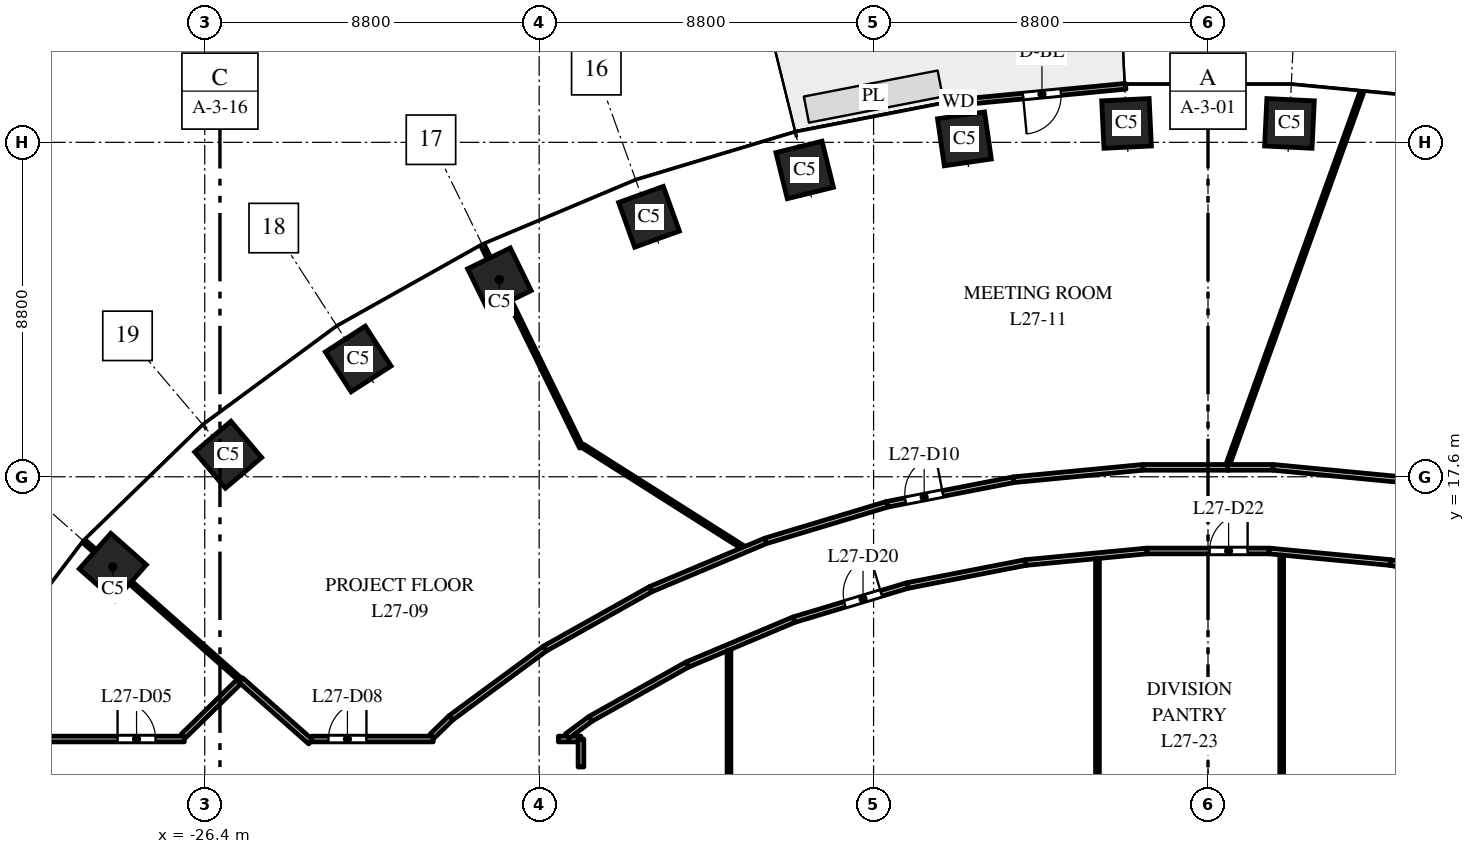
"""IFC4 building model, lengths in metres.
Left out: names, types, materials, properties, quantities, classifications, styles, units other than length and angle.
Written with IfcOpenShell. Run it as: python <this file> out.ifc"""

import sys

from ifc_helpers import new_model, si_unit, direction, frame, frame_2d, origin, origin_2d, place, context, subcontext, project, spatial, rectangle, extrude, element, fill, save


model = new_model("IFC4")
c1 = context("Model", 3, precision=1e-05, world=origin(), true_north=direction((0.0, 1.0)))
c2 = subcontext(c1, "Body", "Model", "MODEL_VIEW")
j1 = project(units=[si_unit("LENGTHUNIT", "METRE"), si_unit("PLANEANGLEUNIT", "RADIAN")], contexts=[c1])
p1 = place(None, origin())
s1 = spatial("IfcSite", under=j1, at=p1, CompositionType="ELEMENT")
p2 = place(p1, origin())
s2 = spatial("IfcBuilding", under=s1, at=p2, CompositionType="ELEMENT")
p3 = place(p2, frame((0.0, 0.0, 120.0)))
s3 = spatial("IfcBuildingStorey", under=s2, at=p3, CompositionType="ELEMENT", Elevation=120.0)
for number, where, z_axis, x_axis in (
    (1, (2.143, 26.898, 0.0), (0.0, 0.0, 1.0), (-0.999, 0.048, 0.0)),
    (2, (-2.143, 26.898, 0.0), (0.0, 0.0, 1.0), (-0.999, -0.048, 0.0)),
    (3, (-6.409, 26.491, 0.0), (0.0, 0.0, 1.0), (-0.99, -0.143, 0.0)),
    (4, (-10.613, 25.674, 0.0), (0.0, 0.0, 1.0), (-0.971, -0.24, 0.0)),
    (5, (-14.709, 24.441, 0.0), (0.0, 0.0, 1.0), (-0.941, -0.338, 0.0)),
    (6, (-18.646, 22.785, 0.0), (0.0, 0.0, 1.0), (-0.898, -0.439, 0.0)),
    (7, (-22.362, 20.7, 0.0), (0.0, 0.0, 1.0), (-0.84, -0.542, 0.0)),
    (8, (-25.783, 18.18, 0.0), (0.0, 0.0, 1.0), (-0.763, -0.646, 0.0)),
    (9, (-28.819, 15.23, 0.0), (0.0, 0.0, 1.0), (-0.663, -0.749, 0.0)),
):
    element("IfcColumn", number, at=place(p3, frame(where, z_axis=z_axis, x_axis=x_axis)), inside=s3, PredefinedType="COLUMN", context=c2, shape_type="SweptSolid", body=[
        extrude(rectangle(XDim=1.25, YDim=1.25, at=origin_2d()), origin(), (0.0, 0.0, 1.0), 4.0),
    ])
p4 = place(p3, frame((-2.166, 27.875, 0.0), z_axis=(0.0, 0.0, 1.0), x_axis=(-0.995473879823, -0.095035543824, 0.0)))
e10 = element("IfcWall", 10, at=p4, inside=s3, PredefinedType="STANDARD", context=c2, shape_type="SweptSolid", body=[
    extrude(rectangle(XDim=4.426, YDim=0.15, at=frame_2d((2.213, 0.0))), origin(), (0.0, 0.0, 1.0), 3.7),
])
p5 = place(p4, frame((1.713, 0.0, 0.0)))
e11 = element("IfcOpeningElement", 11, at=p5, cuts=e10, PredefinedType="OPENING", context=c2, shape_type="SweptSolid", body=[
    extrude(rectangle(XDim=1.0, YDim=2.4, at=frame_2d((0.5, 1.2))), frame((0.0, 0.085, 0.0), z_axis=(0.0, -1.0, 0.0), x_axis=(1.0, 0.0, 0.0)), (0.0, 0.0, 1.0), 0.17),
])
p6 = place(p3, frame((-31.5, 10.7, 0.0), z_axis=(0.0, 0.0, 1.0), x_axis=(1.0, 0.0, 0.0)))
e12 = element("IfcWall", 12, at=p6, inside=s3, PredefinedType="PARTITIONING", context=c2, shape_type="SweptSolid", body=[
    extrude(rectangle(XDim=4.563, YDim=0.15, at=frame_2d((2.281, 0.0))), origin(), (0.0, 0.0, 1.0), 3.1),
])
p7 = place(p6, frame((2.806, 0.0, 0.0)))
e13 = element("IfcOpeningElement", 13, at=p7, cuts=e12, PredefinedType="OPENING", context=c2, shape_type="SweptSolid", body=[
    extrude(rectangle(XDim=1.0, YDim=2.1, at=frame_2d((0.5, 1.05))), frame((0.0, 0.085, 0.0), z_axis=(0.0, -1.0, 0.0), x_axis=(1.0, 0.0, 0.0)), (0.0, 0.0, 1.0), 0.17),
])
p8 = place(p3, frame((-29.569, 15.895, 0.0), z_axis=(0.0, 0.0, 1.0), x_axis=(0.74891259533, -0.662668789484, 0.0)))
e14 = element("IfcWall", 14, at=p8, inside=s3, PredefinedType="PARTITIONING", context=c2, shape_type="SweptSolid", body=[
    extrude(rectangle(XDim=5.495, YDim=0.1, at=frame_2d((2.747, 0.0))), origin(), (0.0, 0.0, 1.0), 2.9),
])
p9 = place(p3, frame((-26.964, 10.777, 0.0), z_axis=(0.0, 0.0, 1.0), x_axis=(0.714923203438, 0.699202984251, 0.0)))
e15 = element("IfcWall", 15, at=p9, inside=s3, PredefinedType="PARTITIONING", context=c2, shape_type="SweptSolid", body=[
    extrude(rectangle(XDim=2.112, YDim=0.15, at=frame_2d((1.056, 0.0))), origin(), (0.0, 0.0, 1.0), 3.7),
])
p10 = place(p3, frame((-25.454, 12.254, 0.0), z_axis=(0.0, 0.0, 1.0), x_axis=(0.74918446265, -0.662361412617, 0.0)))
e16 = element("IfcWall", 16, at=p10, inside=s3, PredefinedType="PARTITIONING", context=c2, shape_type="SweptSolid", body=[
    extrude(rectangle(XDim=2.455, YDim=0.15, at=frame_2d((1.228, 0.0))), origin(), (0.0, 0.0, 1.0), 3.7),
])
p11 = place(p3, frame((-23.584, 10.7, 0.0), z_axis=(0.0, 0.0, 1.0), x_axis=(1.0, 0.0, 0.0)))
e17 = element("IfcWall", 17, at=p11, inside=s3, PredefinedType="PARTITIONING", context=c2, shape_type="SweptSolid", body=[
    extrude(rectangle(XDim=3.197, YDim=0.15, at=frame_2d((1.599, 0.0))), origin(), (0.0, 0.0, 1.0), 3.7),
])
p12 = place(p11, frame((0.439, 0.0, 0.0)))
e18 = element("IfcOpeningElement", 18, at=p12, cuts=e17, PredefinedType="OPENING", context=c2, shape_type="SweptSolid", body=[
    extrude(rectangle(XDim=1.0, YDim=2.1, at=frame_2d((0.5, 1.05))), frame((0.0, 0.085, 0.0), z_axis=(0.0, -1.0, 0.0), x_axis=(1.0, 0.0, 0.0)), (0.0, 0.0, 1.0), 0.17),
])
p13 = place(p3, frame((-20.418, 10.775, 0.0), z_axis=(0.0, 0.0, 1.0), x_axis=(0.717033879939, 0.697038316751, 0.0)))
e19 = element("IfcWall", 19, at=p13, inside=s3, PredefinedType="PARTITIONING", context=c2, shape_type="SweptSolid", body=[
    extrude(rectangle(XDim=0.696, YDim=0.15, at=frame_2d((0.348, 0.0))), origin(), (0.0, 0.0, 1.0), 3.7),
])
p14 = place(p3, frame((-19.919, 11.26, 0.0), z_axis=(0.0, 0.0, 1.0), x_axis=(0.805185638843, 0.593022838516, 0.0)))
e20 = element("IfcWall", 20, at=p14, inside=s3, PredefinedType="PARTITIONING", context=c2, shape_type="SweptSolid", body=[
    extrude(rectangle(XDim=3.073, YDim=0.15, at=frame_2d((1.536, 0.0))), origin(), (0.0, 0.0, 1.0), 2.75),
])
p15 = place(p3, frame((-19.086, 23.685, 0.0), z_axis=(0.0, 0.0, 1.0), x_axis=(0.439196051017, -0.898391244821, 0.0)))
e21 = element("IfcWall", 21, at=p15, inside=s3, PredefinedType="PARTITIONING", context=c2, shape_type="SweptSolid", body=[
    extrude(rectangle(XDim=5.908, YDim=0.1, at=frame_2d((2.954, 0.0))), origin(), (0.0, 0.0, 1.0), 3.7),
])
p16 = place(p3, frame((-17.445, 13.082, 0.0), z_axis=(0.0, 0.0, 1.0), x_axis=(0.872072095629, 0.489377420837, 0.0)))
e22 = element("IfcWall", 22, at=p16, inside=s3, PredefinedType="PARTITIONING", context=c2, shape_type="SweptSolid", body=[
    extrude(rectangle(XDim=3.188, YDim=0.15, at=frame_2d((1.594, 0.0))), origin(), (0.0, 0.0, 1.0), 3.7),
])
p17 = place(p3, frame((-17.095, 10.7, 0.0), z_axis=(0.0, 0.0, 1.0), x_axis=(1.0, 0.0, 0.0)))
e23 = element("IfcWall", 23, at=p17, inside=s3, PredefinedType="PARTITIONING", context=c2, shape_type="SweptSolid", body=[
    extrude(rectangle(XDim=0.595, YDim=0.15, at=frame_2d((0.297, 0.0))), origin(), (0.0, 0.0, 1.0), 3.7),
])
p18 = place(p3, frame((-16.867, 10.775, 0.0), z_axis=(0.0, 0.0, 1.0), x_axis=(0.804751563869, 0.593611759023, 0.0)))
e24 = element("IfcWall", 24, at=p18, inside=s3, PredefinedType="PARTITIONING", context=c2, shape_type="SweptSolid", body=[
    extrude(rectangle(XDim=0.767, YDim=0.15, at=frame_2d((0.383, 0.0))), origin(), (0.0, 0.0, 1.0), 3.7),
])
p19 = place(p3, frame((-16.452, 18.412, 0.0), z_axis=(0.0, 0.0, 1.0), x_axis=(0.844845649947, -0.535010119312, 0.0)))
e25 = element("IfcWall", 25, at=p19, inside=s3, PredefinedType="PARTITIONING", context=c2, shape_type="SweptSolid", body=[
    extrude(rectangle(XDim=4.983, YDim=0.1, at=frame_2d((2.492, 0.0))), origin(), (0.0, 0.0, 1.0), 2.85),
])
p20 = place(p3, frame((-16.5, 9.964, 0.0), z_axis=(0.0, 0.0, 1.0), x_axis=(0.0, 1.0, 0.0)))
e26 = element("IfcWall", 26, at=p20, inside=s3, PredefinedType="PARTITIONING", context=c2, shape_type="SweptSolid", body=[
    extrude(rectangle(XDim=0.736, YDim=0.15, at=frame_2d((0.368, 0.0))), origin(), (0.0, 0.0, 1.0), 3.7),
])
p21 = place(p3, frame((-16.25, 11.23, 0.0), z_axis=(0.0, 0.0, 1.0), x_axis=(0.872147381065, 0.489243237767, 0.0)))
e27 = element("IfcWall", 27, at=p21, inside=s3, PredefinedType="PARTITIONING", context=c2, shape_type="SweptSolid", body=[
    extrude(rectangle(XDim=2.927, YDim=0.15, at=frame_2d((1.464, 0.0))), origin(), (0.0, 0.0, 1.0), 2.75),
])
p22 = place(p3, frame((-14.665, 14.642, 0.0), z_axis=(0.0, 0.0, 1.0), x_axis=(0.921789499058, 0.38769075231, 0.0)))
e28 = element("IfcWall", 28, at=p22, inside=s3, PredefinedType="PARTITIONING", context=c2, shape_type="SweptSolid", body=[
    extrude(rectangle(XDim=3.278, YDim=0.15, at=frame_2d((1.639, 0.0))), origin(), (0.0, 0.0, 1.0), 2.85),
])
p23 = place(p3, frame((-13.697, 12.662, 0.0), z_axis=(0.0, 0.0, 1.0), x_axis=(0.921751821358, 0.387780324183, 0.0)))
e29 = element("IfcWall", 29, at=p23, inside=s3, PredefinedType="PARTITIONING", context=c2, shape_type="SweptSolid", body=[
    extrude(rectangle(XDim=3.038, YDim=0.15, at=frame_2d((1.519, 0.0))), origin(), (0.0, 0.0, 1.0), 2.85),
])
p24 = place(p3, frame((-12.605, -13.036, 0.0), z_axis=(0.0, 0.0, 1.0), x_axis=(0.0, 1.0, 0.0)))
e30 = element("IfcWall", 30, at=p24, inside=s3, PredefinedType="PARTITIONING", context=c2, shape_type="SweptSolid", body=[
    extrude(rectangle(XDim=26.072, YDim=0.1, at=frame_2d((13.036, 0.0))), origin(), (0.0, 0.0, 1.0), 2.75),
])
p25 = place(p3, frame((-11.643, 15.913, 0.0), z_axis=(0.0, 0.0, 1.0), x_axis=(0.957584891346, 0.288151307243, 0.0)))
e31 = element("IfcWall", 31, at=p25, inside=s3, PredefinedType="PARTITIONING", context=c2, shape_type="SweptSolid", body=[
    extrude(rectangle(XDim=3.345, YDim=0.15, at=frame_2d((1.672, 0.0))), origin(), (0.0, 0.0, 1.0), 3.7),
])
p26 = place(p3, frame((-10.897, 13.84, 0.0), z_axis=(0.0, 0.0, 1.0), x_axis=(0.957606118849, 0.28808075455, 0.0)))
e32 = element("IfcWall", 32, at=p26, inside=s3, PredefinedType="PARTITIONING", context=c2, shape_type="SweptSolid", body=[
    extrude(rectangle(XDim=3.117, YDim=0.15, at=frame_2d((1.559, 0.0))), origin(), (0.0, 0.0, 1.0), 3.7),
])
p27 = place(p26, frame((1.4, 0.0, 0.0)))
e33 = element("IfcOpeningElement", 33, at=p27, cuts=e32, PredefinedType="OPENING", context=c2, shape_type="SweptSolid", body=[
    extrude(rectangle(XDim=1.0, YDim=2.1, at=frame_2d((0.5, 1.05))), frame((0.0, 0.085, 0.0), z_axis=(0.0, -1.0, 0.0), x_axis=(1.0, 0.0, 0.0)), (0.0, 0.0, 1.0), 0.17),
])
p28 = place(p3, frame((-8.44, 16.877, 0.0), z_axis=(0.0, 0.0, 1.0), x_axis=(0.981665220565, 0.190613207134, 0.0)))
e34 = element("IfcWall", 34, at=p28, inside=s3, PredefinedType="PARTITIONING", context=c2, shape_type="SweptSolid", body=[
    extrude(rectangle(XDim=3.389, YDim=0.15, at=frame_2d((1.695, 0.0))), origin(), (0.0, 0.0, 1.0), 2.85),
])
p29 = place(p28, frame((0.489, 0.0, 0.0)))
e35 = element("IfcOpeningElement", 35, at=p29, cuts=e34, PredefinedType="OPENING", context=c2, shape_type="SweptSolid", body=[
    extrude(rectangle(XDim=1.0, YDim=2.1, at=frame_2d((0.5, 1.05))), frame((0.0, 0.085, 0.0), z_axis=(0.0, -1.0, 0.0), x_axis=(1.0, 0.0, 0.0)), (0.0, 0.0, 1.0), 0.17),
])
p30 = place(p3, frame((-7.912, 14.738, 0.0), z_axis=(0.0, 0.0, 1.0), x_axis=(0.981588545092, 0.191007665145, 0.0)))
e36 = element("IfcWall", 36, at=p30, inside=s3, PredefinedType="PARTITIONING", context=c2, shape_type="SweptSolid", body=[
    extrude(rectangle(XDim=3.172, YDim=0.15, at=frame_2d((1.586, 0.0))), origin(), (0.0, 0.0, 1.0), 2.85),
])
p31 = place(p3, frame((-5.113, 17.523, 0.0), z_axis=(0.0, 0.0, 1.0), x_axis=(0.995466844572, 0.095109207532, 0.0)))
e37 = element("IfcWall", 37, at=p31, inside=s3, PredefinedType="PARTITIONING", context=c2, shape_type="SweptSolid", body=[
    extrude(rectangle(XDim=3.417, YDim=0.15, at=frame_2d((1.708, 0.0))), origin(), (0.0, 0.0, 1.0), 3.7),
])
p32 = place(p3, frame((-4.798, 15.344, 0.0), z_axis=(0.0, 0.0, 1.0), x_axis=(0.995491705426, 0.09484863957, 0.0)))
e38 = element("IfcWall", 38, at=p32, inside=s3, PredefinedType="PARTITIONING", context=c2, shape_type="SweptSolid", body=[
    extrude(rectangle(XDim=3.205, YDim=0.15, at=frame_2d((1.602, 0.0))), origin(), (0.0, 0.0, 1.0), 3.7),
])
p33 = place(p3, frame((-2.909, 7.082, 0.0), z_axis=(0.0, 0.0, 1.0), x_axis=(0.0, 1.0, 0.0)))
e39 = element("IfcWall", 39, at=p33, inside=s3, PredefinedType="PARTITIONING", context=c2, shape_type="SweptSolid", body=[
    extrude(rectangle(XDim=8.363, YDim=0.1, at=frame_2d((4.182, 0.0))), origin(), (0.0, 0.0, 1.0), 2.9),
])
p34 = place(p3, frame((-1.712, 17.848, 0.0), z_axis=(0.0, 0.0, 1.0), x_axis=(1.0, 0.0, 0.0)))
e40 = element("IfcWall", 40, at=p34, inside=s3, PredefinedType="PARTITIONING", context=c2, shape_type="SweptSolid", body=[
    extrude(rectangle(XDim=2.262, YDim=0.15, at=frame_2d((1.131, 0.0))), origin(), (0.0, 0.0, 1.0), 2.85),
])
p35 = place(p3, frame((-1.608, 15.648, 0.0), z_axis=(0.0, 0.0, 1.0), x_axis=(1.0, 0.0, 0.0)))
e41 = element("IfcWall", 41, at=p35, inside=s3, PredefinedType="PARTITIONING", context=c2, shape_type="SweptSolid", body=[
    extrude(rectangle(XDim=3.216, YDim=0.15, at=frame_2d((1.608, 0.0))), origin(), (0.0, 0.0, 1.0), 2.85),
])
p36 = place(p35, frame((1.65, 0.0, 0.0)))
e42 = element("IfcOpeningElement", 42, at=p36, cuts=e41, PredefinedType="OPENING", context=c2, shape_type="SweptSolid", body=[
    extrude(rectangle(XDim=1.0, YDim=2.1, at=frame_2d((0.5, 1.05))), frame((0.0, 0.085, 0.0), z_axis=(0.0, -1.0, 0.0), x_axis=(1.0, 0.0, 0.0)), (0.0, 0.0, 1.0), 0.17),
])
p37 = place(p3, frame((0.523, 17.923, 0.0), z_axis=(0.0, 0.0, 1.0), x_axis=(0.338475258228, 0.940975291688, 0.0)))
e43 = element("IfcWall", 43, at=p37, inside=s3, PredefinedType="PARTITIONING", context=c2, shape_type="SweptSolid", body=[
    extrude(rectangle(XDim=10.408, YDim=0.1, at=frame_2d((5.204, 0.0))), origin(), (0.0, 0.0, 1.0), 2.9),
])
p38 = place(p3, frame((0.509, 17.848, 0.0), z_axis=(0.0, 0.0, 1.0), x_axis=(1.0, 0.0, 0.0)))
e44 = element("IfcWall", 44, at=p38, inside=s3, PredefinedType="PARTITIONING", context=c2, shape_type="SweptSolid", body=[
    extrude(rectangle(XDim=1.203, YDim=0.15, at=frame_2d((0.602, 0.0))), origin(), (0.0, 0.0, 1.0), 3.7),
])
p39 = place(p3, frame((1.608, 15.648, 0.0), z_axis=(0.0, 0.0, 1.0), x_axis=(0.995491705426, -0.09484863957, 0.0)))
e45 = element("IfcWall", 45, at=p39, inside=s3, PredefinedType="PARTITIONING", context=c2, shape_type="SweptSolid", body=[
    extrude(rectangle(XDim=3.205, YDim=0.15, at=frame_2d((1.602, 0.0))), origin(), (0.0, 0.0, 1.0), 2.85),
])
p40 = place(p3, frame((1.712, 17.848, 0.0), z_axis=(0.0, 0.0, 1.0), x_axis=(0.995466844572, -0.095109207532, 0.0)))
e46 = element("IfcWall", 46, at=p40, inside=s3, PredefinedType="PARTITIONING", context=c2, shape_type="SweptSolid", body=[
    extrude(rectangle(XDim=3.417, YDim=0.15, at=frame_2d((1.708, 0.0))), origin(), (0.0, 0.0, 1.0), 2.85),
])
p41 = place(p3, frame((1.939, 7.307, 0.0), z_axis=(0.0, 0.0, 1.0), x_axis=(0.0, 1.0, 0.0)))
e47 = element("IfcWall", 47, at=p41, inside=s3, PredefinedType="PARTITIONING", context=c2, shape_type="SweptSolid", body=[
    extrude(rectangle(XDim=8.23, YDim=0.1, at=frame_2d((4.115, 0.0))), origin(), (0.0, 0.0, 1.0), 2.85),
])
p42 = place(p3, frame((4.798, 15.344, 0.0), z_axis=(0.0, 0.0, 1.0), x_axis=(0.981588545092, -0.191007665145, 0.0)))
e48 = element("IfcWall", 48, at=p42, inside=s3, PredefinedType="PARTITIONING", context=c2, shape_type="SweptSolid", body=[
    extrude(rectangle(XDim=3.172, YDim=0.15, at=frame_2d((1.586, 0.0))), origin(), (0.0, 0.0, 1.0), 3.7),
])
p43 = place(p5, origin())
e49 = element("IfcDoor", 49, at=p43, inside=s3, OperationType="SINGLE_SWING_RIGHT", PredefinedType="DOOR", context=c2, shape_type="SweptSolid", body=[
    extrude(rectangle(XDim=1.0, YDim=2.4, at=frame_2d((0.5, 1.2))), frame((0.0, 0.025, 0.0), z_axis=(0.0, -1.0, 0.0), x_axis=(1.0, 0.0, 0.0)), (0.0, 0.0, 1.0), 0.05),
])
fill(e11, e49)
p44 = place(p7, origin())
e50 = element("IfcDoor", 50, at=p44, inside=s3, OperationType="SINGLE_SWING_LEFT", PredefinedType="DOOR", context=c2, shape_type="SweptSolid", body=[
    extrude(rectangle(XDim=1.0, YDim=2.1, at=frame_2d((0.5, 1.05))), frame((0.0, 0.025, 0.0), z_axis=(0.0, -1.0, 0.0), x_axis=(1.0, 0.0, 0.0)), (0.0, 0.0, 1.0), 0.05),
])
fill(e13, e50)
p45 = place(p12, origin())
e51 = element("IfcDoor", 51, at=p45, inside=s3, OperationType="SINGLE_SWING_RIGHT", PredefinedType="DOOR", context=c2, shape_type="SweptSolid", body=[
    extrude(rectangle(XDim=1.0, YDim=2.1, at=frame_2d((0.5, 1.05))), frame((0.0, 0.025, 0.0), z_axis=(0.0, -1.0, 0.0), x_axis=(1.0, 0.0, 0.0)), (0.0, 0.0, 1.0), 0.05),
])
fill(e18, e51)
p46 = place(p29, origin())
e52 = element("IfcDoor", 52, at=p46, inside=s3, OperationType="SINGLE_SWING_RIGHT", PredefinedType="DOOR", context=c2, shape_type="SweptSolid", body=[
    extrude(rectangle(XDim=1.0, YDim=2.1, at=frame_2d((0.5, 1.05))), frame((0.0, 0.025, 0.0), z_axis=(0.0, -1.0, 0.0), x_axis=(1.0, 0.0, 0.0)), (0.0, 0.0, 1.0), 0.05),
])
fill(e35, e52)
p47 = place(p27, origin())
e53 = element("IfcDoor", 53, at=p47, inside=s3, OperationType="SINGLE_SWING_RIGHT", PredefinedType="DOOR", context=c2, shape_type="SweptSolid", body=[
    extrude(rectangle(XDim=1.0, YDim=2.1, at=frame_2d((0.5, 1.05))), frame((0.0, 0.025, 0.0), z_axis=(0.0, -1.0, 0.0), x_axis=(1.0, 0.0, 0.0)), (0.0, 0.0, 1.0), 0.05),
])
fill(e33, e53)
p48 = place(p36, origin())
e54 = element("IfcDoor", 54, at=p48, inside=s3, OperationType="SINGLE_SWING_RIGHT", PredefinedType="DOOR", context=c2, shape_type="SweptSolid", body=[
    extrude(rectangle(XDim=1.0, YDim=2.1, at=frame_2d((0.5, 1.05))), frame((0.0, 0.025, 0.0), z_axis=(0.0, -1.0, 0.0), x_axis=(1.0, 0.0, 0.0)), (0.0, 0.0, 1.0), 0.05),
])
fill(e42, e54)
save(model, sys.argv[1])
